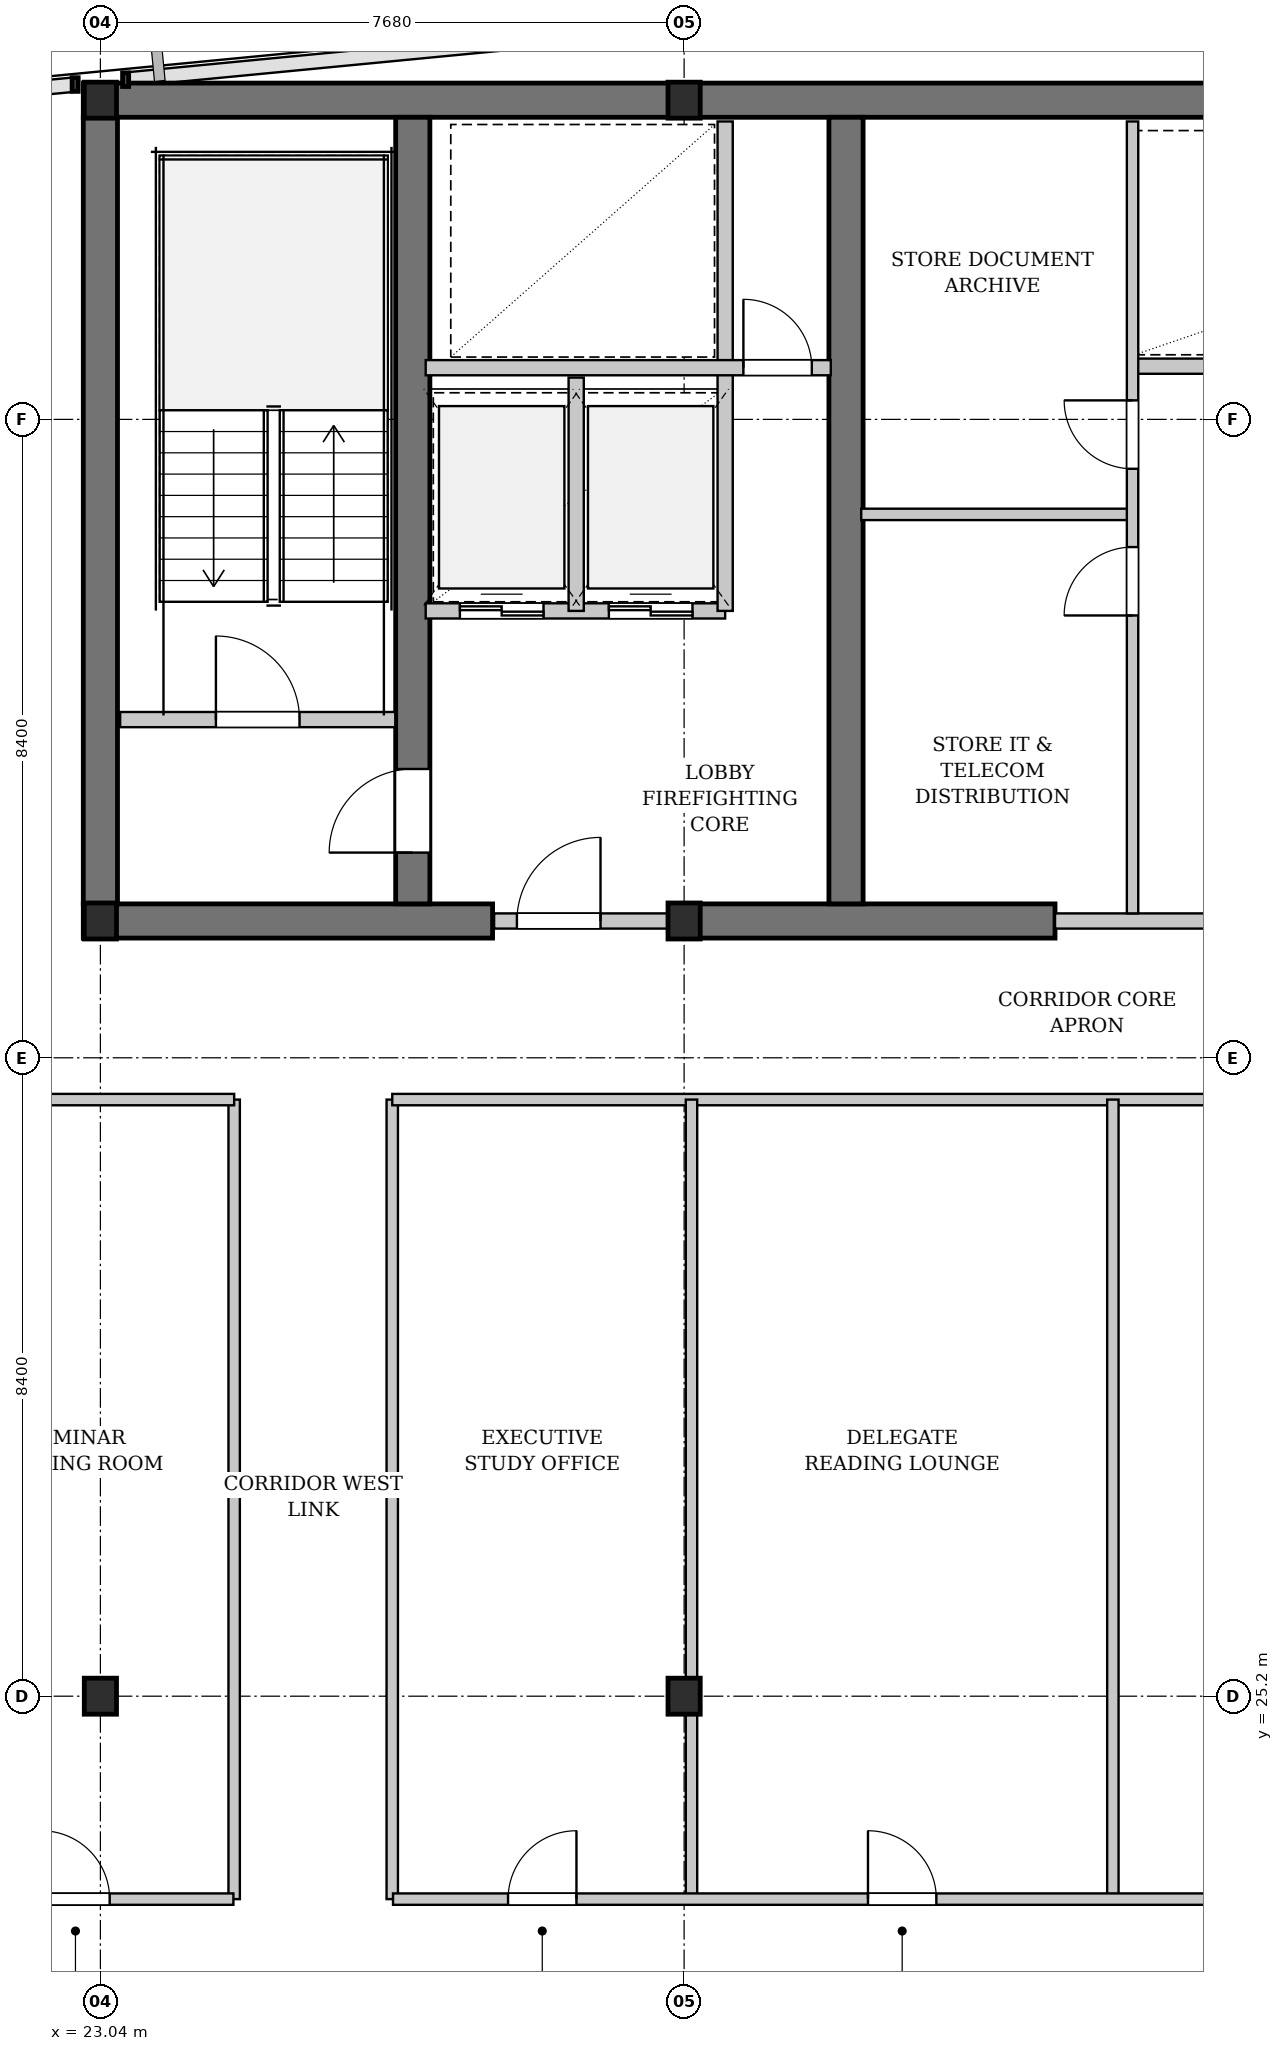
"""IFC4 building model, lengths in metres.
Left out: names, types, materials, properties, quantities, classifications, styles, units other than length and angle.
Written with IfcOpenShell. Run it as: python <this file> out.ifc"""

import sys

from ifc_helpers import new_model, si_unit, direction, frame, frame_2d, origin, origin_2d, place, context, subcontext, project, spatial, rectangle, i_section, extrude, element, fill, save


model = new_model("IFC4")
c1 = context("Model", 3, precision=1e-05, world=origin(), true_north=direction((0.0, 1.0)))
c2 = subcontext(c1, "Body", "Model", "MODEL_VIEW")
j1 = project(units=[si_unit("LENGTHUNIT", "METRE"), si_unit("PLANEANGLEUNIT", "RADIAN")], contexts=[c1])
p1 = place(None, origin())
s1 = spatial("IfcSite", under=j1, at=p1, CompositionType="ELEMENT")
p2 = place(p1, origin())
s2 = spatial("IfcBuilding", under=s1, at=p2, CompositionType="ELEMENT")
p3 = place(p2, frame((0.0, 0.0, 123.7)))
s3 = spatial("IfcBuildingStorey", under=s2, at=p3, CompositionType="ELEMENT", Elevation=123.7)
p4 = place(p3, frame((22.815, 46.2, 0.0), z_axis=(0.0, 0.0, 1.0), x_axis=(1.0, 0.0, 0.0)))
e1 = element("IfcWall", 1, at=p4, inside=s3, PredefinedType="SHEAR", context=c2, shape_type="SweptSolid", body=[
    extrude(rectangle(XDim=31.17, YDim=0.45, at=frame_2d((15.585, 0.0))), origin(), (0.0, 0.0, 1.0), 3.18),
])
p5 = place(p3, frame((22.815, 35.4, 0.0), z_axis=(0.0, 0.0, 1.0), x_axis=(1.0, 0.0, 0.0)))
e2 = element("IfcWall", 2, at=p5, inside=s3, PredefinedType="SHEAR", context=c2, shape_type="SweptSolid", body=[
    extrude(rectangle(XDim=5.385, YDim=0.45, at=frame_2d((2.692, 0.0))), origin(), (0.0, 0.0, 1.0), 3.18),
])
p6 = place(p3, frame((30.72, 35.4, 0.0), z_axis=(0.0, 0.0, 1.0), x_axis=(1.0, 0.0, 0.0)))
e3 = element("IfcWall", 3, at=p6, inside=s3, PredefinedType="SHEAR", context=c2, shape_type="SweptSolid", body=[
    extrude(rectangle(XDim=4.88, YDim=0.45, at=frame_2d((2.44, 0.0))), origin(), (0.0, 0.0, 1.0), 3.18),
])
p7 = place(p3, frame((23.04, 35.625, 0.0), z_axis=(0.0, 0.0, 1.0), x_axis=(0.0, 1.0, 0.0)))
e4 = element("IfcWall", 4, at=p7, inside=s3, PredefinedType="SHEAR", context=c2, shape_type="SweptSolid", body=[
    extrude(rectangle(XDim=10.35, YDim=0.45, at=frame_2d((5.175, 0.0))), origin(), (0.0, 0.0, 1.0), 3.18),
])
p8 = place(p3, frame((27.15, 35.625, 0.0), z_axis=(0.0, 0.0, 1.0), x_axis=(0.0, 1.0, 0.0)))
e5 = element("IfcWall", 5, at=p8, inside=s3, PredefinedType="SHEAR", context=c2, shape_type="SweptSolid", body=[
    extrude(rectangle(XDim=10.35, YDim=0.45, at=frame_2d((5.175, 0.0))), origin(), (0.0, 0.0, 1.0), 3.18),
])
p9 = place(p8, frame((0.675, 0.0, 0.0)))
e6 = element("IfcOpeningElement", 6, at=p9, cuts=e5, PredefinedType="OPENING", context=c2, shape_type="SweptSolid", body=[
    extrude(rectangle(XDim=1.1, YDim=2.15, at=frame_2d((0.55, 1.075))), frame((0.0, 0.235, 0.0), z_axis=(0.0, -1.0, 0.0), x_axis=(1.0, 0.0, 0.0)), (0.0, 0.0, 1.0), 0.47),
])
p10 = place(p3, frame((32.85, 35.625, 0.0), z_axis=(0.0, 0.0, 1.0), x_axis=(0.0, 1.0, 0.0)))
e7 = element("IfcWall", 7, at=p10, inside=s3, PredefinedType="SHEAR", context=c2, shape_type="SweptSolid", body=[
    extrude(rectangle(XDim=10.35, YDim=0.45, at=frame_2d((5.175, 0.0))), origin(), (0.0, 0.0, 1.0), 3.18),
])
for number, where, z_axis, x_axis in (
    (8, (23.04, 35.4, 0.0), (0.0, 0.0, 1.0), (1.0, 0.0, 0.0)),
    (9, (23.04, 46.2, 0.0), (0.0, 0.0, 1.0), (1.0, 0.0, 0.0)),
    (10, (23.04, 25.2, 0.0), (0.0, 0.0, 1.0), (1.0, 0.0, 0.0)),
    (11, (30.72, 35.4, 0.0), (0.0, 0.0, 1.0), (1.0, 0.0, 0.0)),
    (12, (30.72, 46.2, 0.0), (0.0, 0.0, 1.0), (1.0, 0.0, 0.0)),
    (13, (30.72, 25.2, 0.0), (0.0, 0.0, 1.0), (1.0, 0.0, 0.0)),
):
    element("IfcColumn", number, at=place(p3, frame(where, z_axis=z_axis, x_axis=x_axis)), inside=s3, PredefinedType="COLUMN", context=c2, shape_type="SweptSolid", body=[
        extrude(i_section(OverallWidth=0.424, OverallDepth=0.474, WebThickness=0.047, FlangeThickness=0.077, FilletRadius=0.015, at=origin_2d()), origin(), (0.0, 0.0, 1.0), 3.4),
    ])
p11 = place(p3, frame((23.3, 38.05, 0.0), z_axis=(0.0, 0.0, 1.0), x_axis=(1.0, 0.0, 0.0)))
e14 = element("IfcWall", 14, at=p11, inside=s3, PredefinedType="PARTITIONING", context=c2, shape_type="SweptSolid", body=[
    extrude(rectangle(XDim=3.62, YDim=0.2, at=frame_2d((1.81, 0.0))), origin(), (0.0, 0.0, 1.0), 3.18),
])
p12 = place(p11, frame((1.26, 0.0, 0.0)))
e15 = element("IfcOpeningElement", 15, at=p12, cuts=e14, PredefinedType="OPENING", context=c2, shape_type="SweptSolid", body=[
    extrude(rectangle(XDim=1.1, YDim=2.15, at=frame_2d((0.55, 1.075))), frame((0.0, 0.11, 0.0), z_axis=(0.0, -1.0, 0.0), x_axis=(1.0, 0.0, 0.0)), (0.0, 0.0, 1.0), 0.22),
])
p13 = place(p3, frame((28.22, 35.4, 0.0), z_axis=(0.0, 0.0, 1.0), x_axis=(1.0, 0.0, 0.0)))
e16 = element("IfcWall", 16, at=p13, inside=s3, PredefinedType="PARTITIONING", context=c2, shape_type="SweptSolid", body=[
    extrude(rectangle(XDim=2.5, YDim=0.2, at=frame_2d((1.25, 0.0))), origin(), (0.0, 0.0, 1.0), 2.525),
])
p14 = place(p13, frame((0.3, 0.0, 0.0)))
e17 = element("IfcOpeningElement", 17, at=p14, cuts=e16, PredefinedType="OPENING", context=c2, shape_type="SweptSolid", body=[
    extrude(rectangle(XDim=1.1, YDim=2.15, at=frame_2d((0.55, 1.075))), frame((0.0, 0.11, 0.0), z_axis=(0.0, -1.0, 0.0), x_axis=(1.0, 0.0, 0.0)), (0.0, 0.0, 1.0), 0.22),
])
p15 = place(p3, frame((27.32, 39.48, 0.0), z_axis=(0.0, 0.0, 1.0), x_axis=(1.0, 0.0, 0.0)))
e18 = element("IfcWall", 18, at=p15, inside=s3, PredefinedType="PARTITIONING", context=c2, shape_type="SweptSolid", body=[
    extrude(rectangle(XDim=3.94, YDim=0.2, at=frame_2d((1.97, 0.0))), origin(), (0.0, 0.0, 1.0), 3.18),
])
p16 = place(p15, frame((0.45, 0.0, 0.0)))
e19 = element("IfcOpeningElement", 19, at=p16, cuts=e18, PredefinedType="OPENING", context=c2, shape_type="SweptSolid", body=[
    extrude(rectangle(XDim=1.1, YDim=2.2, at=frame_2d((0.55, 1.1))), frame((0.0, 0.11, 0.0), z_axis=(0.0, -1.0, 0.0), x_axis=(1.0, 0.0, 0.0)), (0.0, 0.0, 1.0), 0.22),
])
p17 = place(p15, frame((2.41, 0.0, 0.0)))
e20 = element("IfcOpeningElement", 20, at=p17, cuts=e18, PredefinedType="OPENING", context=c2, shape_type="SweptSolid", body=[
    extrude(rectangle(XDim=1.1, YDim=2.2, at=frame_2d((0.55, 1.1))), frame((0.0, 0.11, 0.0), z_axis=(0.0, -1.0, 0.0), x_axis=(1.0, 0.0, 0.0)), (0.0, 0.0, 1.0), 0.22),
])
p18 = place(p3, frame((29.3, 39.48, 0.0), z_axis=(0.0, 0.0, 1.0), x_axis=(0.0, 1.0, 0.0)))
e21 = element("IfcWall", 21, at=p18, inside=s3, PredefinedType="PARTITIONING", context=c2, shape_type="SweptSolid", body=[
    extrude(rectangle(XDim=3.07, YDim=0.2, at=frame_2d((1.535, 0.0))), origin(), (0.0, 0.0, 1.0), 3.18),
])
p19 = place(p3, frame((31.26, 39.48, 0.0), z_axis=(0.0, 0.0, 1.0), x_axis=(0.0, 1.0, 0.0)))
e22 = element("IfcWall", 22, at=p19, inside=s3, PredefinedType="PARTITIONING", context=c2, shape_type="SweptSolid", body=[
    extrude(rectangle(XDim=6.44, YDim=0.2, at=frame_2d((3.22, 0.0))), origin(), (0.0, 0.0, 1.0), 3.18),
])
p20 = place(p3, frame((27.32, 42.68, 0.0), z_axis=(0.0, 0.0, 1.0), x_axis=(1.0, 0.0, 0.0)))
e23 = element("IfcWall", 23, at=p20, inside=s3, PredefinedType="PARTITIONING", context=c2, shape_type="SweptSolid", body=[
    extrude(rectangle(XDim=5.33, YDim=0.2, at=frame_2d((2.665, 0.0))), origin(), (0.0, 0.0, 1.0), 3.18),
])
p21 = place(p20, frame((4.18, 0.0, 0.0)))
e24 = element("IfcOpeningElement", 24, at=p21, cuts=e23, PredefinedType="OPENING", context=c2, shape_type="SweptSolid", body=[
    extrude(rectangle(XDim=0.9, YDim=2.15, at=frame_2d((0.45, 1.075))), frame((0.0, 0.11, 0.0), z_axis=(0.0, -1.0, 0.0), x_axis=(1.0, 0.0, 0.0)), (0.0, 0.0, 1.0), 0.22),
])
p22 = place(p3, frame((35.6, 35.4, 0.0), z_axis=(0.0, 0.0, 1.0), x_axis=(1.0, 0.0, 0.0)))
e25 = element("IfcWall", 25, at=p22, inside=s3, PredefinedType="PARTITIONING", context=c2, shape_type="SweptSolid", body=[
    extrude(rectangle(XDim=6.5, YDim=0.2, at=frame_2d((3.25, 0.0))), origin(), (0.0, 0.0, 1.0), 2.525),
])
p23 = place(p22, frame((3.8, 0.0, 0.0)))
e26 = element("IfcOpeningElement", 26, at=p23, cuts=e25, PredefinedType="OPENING", context=c2, shape_type="SweptSolid", body=[
    extrude(rectangle(XDim=1.8, YDim=2.3, at=frame_2d((0.9, 1.15))), frame((0.0, 0.11, 0.0), z_axis=(0.0, -1.0, 0.0), x_axis=(1.0, 0.0, 0.0)), (0.0, 0.0, 1.0), 0.22),
])
p24 = place(p3, frame((36.6, 42.7, 0.0), z_axis=(0.0, 0.0, 1.0), x_axis=(1.0, 0.0, 0.0)))
e27 = element("IfcWall", 27, at=p24, inside=s3, PredefinedType="PARTITIONING", context=c2, shape_type="SweptSolid", body=[
    extrude(rectangle(XDim=5.25, YDim=0.2, at=frame_2d((2.625, 0.0))), origin(), (0.0, 0.0, 1.0), 3.18),
])
p25 = place(p3, frame((33.05, 40.75, 0.0), z_axis=(0.0, 0.0, 1.0), x_axis=(1.0, 0.0, 0.0)))
e28 = element("IfcWall", 28, at=p25, inside=s3, PredefinedType="PARTITIONING", context=c2, shape_type="SweptSolid", body=[
    extrude(rectangle(XDim=3.57, YDim=0.15, at=frame_2d((1.785, 0.0))), origin(), (0.0, 0.0, 1.0), 3.18),
])
p26 = place(p3, frame((36.62, 35.5, 0.0), z_axis=(0.0, 0.0, 1.0), x_axis=(0.0, 1.0, 0.0)))
e29 = element("IfcWall", 29, at=p26, inside=s3, PredefinedType="PARTITIONING", context=c2, shape_type="SweptSolid", body=[
    extrude(rectangle(XDim=10.42, YDim=0.15, at=frame_2d((5.21, 0.0))), origin(), (0.0, 0.0, 1.0), 3.18),
])
p27 = place(p26, frame((3.92, 0.0, 0.0)))
e30 = element("IfcOpeningElement", 30, at=p27, cuts=e29, PredefinedType="OPENING", context=c2, shape_type="SweptSolid", body=[
    extrude(rectangle(XDim=0.9, YDim=2.15, at=frame_2d((0.45, 1.075))), frame((0.0, 0.085, 0.0), z_axis=(0.0, -1.0, 0.0), x_axis=(1.0, 0.0, 0.0)), (0.0, 0.0, 1.0), 0.17),
])
p28 = place(p26, frame((5.85, 0.0, 0.0)))
e31 = element("IfcOpeningElement", 31, at=p28, cuts=e29, PredefinedType="OPENING", context=c2, shape_type="SweptSolid", body=[
    extrude(rectangle(XDim=0.9, YDim=2.15, at=frame_2d((0.45, 1.075))), frame((0.0, 0.085, 0.0), z_axis=(0.0, -1.0, 0.0), x_axis=(1.0, 0.0, 0.0)), (0.0, 0.0, 1.0), 0.17),
])
for number, where, z_axis, x_axis in (
    (32, (24.8, 22.53, 0.0), (0.0, 0.0, 1.0), (0.0, 1.0, 0.0)),
    (33, (26.88, 22.53, 0.0), (0.0, 0.0, 1.0), (0.0, 1.0, 0.0)),
):
    element("IfcWall", number, at=place(p3, frame(where, z_axis=z_axis, x_axis=x_axis)), inside=s3, PredefinedType="PARTITIONING", context=c2, shape_type="SweptSolid", body=[
        extrude(rectangle(XDim=10.52, YDim=0.15, at=frame_2d((5.26, 0.0))), origin(), (0.0, 0.0, 1.0), 3.18),
    ])
p29 = place(p3, frame((20.614, 33.05, 0.0), z_axis=(0.0, 0.0, 1.0), x_axis=(1.0, 0.0, 0.0)))
e34 = element("IfcWall", 34, at=p29, inside=s3, PredefinedType="PARTITIONING", context=c2, shape_type="SweptSolid", body=[
    extrude(rectangle(XDim=4.186, YDim=0.15, at=frame_2d((2.093, 0.0))), origin(), (0.0, 0.0, 1.0), 3.18),
])
p30 = place(p3, frame((26.88, 33.05, 0.0), z_axis=(0.0, 0.0, 1.0), x_axis=(1.0, 0.0, 0.0)))
e35 = element("IfcWall", 35, at=p30, inside=s3, PredefinedType="PARTITIONING", context=c2, shape_type="SweptSolid", body=[
    extrude(rectangle(XDim=23.12, YDim=0.15, at=frame_2d((11.56, 0.0))), origin(), (0.0, 0.0, 1.0), 3.18),
])
p31 = place(p3, frame((20.634, 22.53, 0.0), z_axis=(0.0, 0.0, 1.0), x_axis=(1.0, 0.0, 0.0)))
e36 = element("IfcWall", 36, at=p31, inside=s3, PredefinedType="PARTITIONING", context=c2, shape_type="SweptSolid", body=[
    extrude(rectangle(XDim=4.156, YDim=0.15, at=frame_2d((2.078, 0.0))), origin(), (0.0, 0.0, 1.0), 3.18),
])
p32 = place(p31, frame((1.628, 0.0, 0.0)))
e37 = element("IfcOpeningElement", 37, at=p32, cuts=e36, PredefinedType="OPENING", context=c2, shape_type="SweptSolid", body=[
    extrude(rectangle(XDim=0.9, YDim=2.15, at=frame_2d((0.45, 1.075))), frame((0.0, 0.085, 0.0), z_axis=(0.0, -1.0, 0.0), x_axis=(1.0, 0.0, 0.0)), (0.0, 0.0, 1.0), 0.17),
])
p33 = place(p3, frame((30.817, 22.53, 0.0), z_axis=(0.0, 0.0, 1.0), x_axis=(0.0, 1.0, 0.0)))
e38 = element("IfcWall", 38, at=p33, inside=s3, PredefinedType="PARTITIONING", context=c2, shape_type="SweptSolid", body=[
    extrude(rectangle(XDim=10.52, YDim=0.15, at=frame_2d((5.26, 0.0))), origin(), (0.0, 0.0, 1.0), 2.525),
])
p34 = place(p3, frame((36.361, 22.53, 0.0), z_axis=(0.0, 0.0, 1.0), x_axis=(0.0, 1.0, 0.0)))
e39 = element("IfcWall", 39, at=p34, inside=s3, PredefinedType="PARTITIONING", context=c2, shape_type="SweptSolid", body=[
    extrude(rectangle(XDim=10.52, YDim=0.15, at=frame_2d((5.26, 0.0))), origin(), (0.0, 0.0, 1.0), 3.18),
])
p35 = place(p3, frame((26.89, 22.53, 0.0), z_axis=(0.0, 0.0, 1.0), x_axis=(1.0, 0.0, 0.0)))
e40 = element("IfcWall", 40, at=p35, inside=s3, PredefinedType="PARTITIONING", context=c2, shape_type="SweptSolid", body=[
    extrude(rectangle(XDim=23.1, YDim=0.15, at=frame_2d((11.55, 0.0))), origin(), (0.0, 0.0, 1.0), 3.18),
])
p36 = place(p35, frame((1.513, 0.0, 0.0)))
e41 = element("IfcOpeningElement", 41, at=p36, cuts=e40, PredefinedType="OPENING", context=c2, shape_type="SweptSolid", body=[
    extrude(rectangle(XDim=0.9, YDim=2.15, at=frame_2d((0.45, 1.075))), frame((0.0, 0.085, 0.0), z_axis=(0.0, -1.0, 0.0), x_axis=(1.0, 0.0, 0.0)), (0.0, 0.0, 1.0), 0.17),
])
p37 = place(p35, frame((6.249, 0.0, 0.0)))
e42 = element("IfcOpeningElement", 42, at=p37, cuts=e40, PredefinedType="OPENING", context=c2, shape_type="SweptSolid", body=[
    extrude(rectangle(XDim=0.9, YDim=2.15, at=frame_2d((0.45, 1.075))), frame((0.0, 0.085, 0.0), z_axis=(0.0, -1.0, 0.0), x_axis=(1.0, 0.0, 0.0)), (0.0, 0.0, 1.0), 0.17),
])
p38 = place(p35, frame((12.602, 0.0, 0.0)))
e43 = element("IfcOpeningElement", 43, at=p38, cuts=e40, PredefinedType="OPENING", context=c2, shape_type="SweptSolid", body=[
    extrude(rectangle(XDim=0.9, YDim=2.15, at=frame_2d((0.45, 1.075))), frame((0.0, 0.085, 0.0), z_axis=(0.0, -1.0, 0.0), x_axis=(1.0, 0.0, 0.0)), (0.0, 0.0, 1.0), 0.17),
])
p39 = place(p35, frame((19.416, 0.0, 0.0)))
e44 = element("IfcOpeningElement", 44, at=p39, cuts=e40, PredefinedType="OPENING", context=c2, shape_type="SweptSolid", body=[
    extrude(rectangle(XDim=0.9, YDim=2.15, at=frame_2d((0.45, 1.075))), frame((0.0, 0.085, 0.0), z_axis=(0.0, -1.0, 0.0), x_axis=(1.0, 0.0, 0.0)), (0.0, 0.0, 1.0), 0.17),
])
p40 = place(p12, origin())
e45 = element("IfcDoor", 45, at=p40, inside=s3, OperationType="SINGLE_SWING_LEFT", PredefinedType="DOOR", context=c2, shape_type="SweptSolid", body=[
    extrude(rectangle(XDim=1.1, YDim=2.15, at=frame_2d((0.55, 1.075))), frame((0.0, 0.025, 0.0), z_axis=(0.0, -1.0, 0.0), x_axis=(1.0, 0.0, 0.0)), (0.0, 0.0, 1.0), 0.05),
])
fill(e15, e45)
p41 = place(p14, origin())
e46 = element("IfcDoor", 46, at=p41, inside=s3, OperationType="SINGLE_SWING_RIGHT", PredefinedType="DOOR", context=c2, shape_type="SweptSolid", body=[
    extrude(rectangle(XDim=1.1, YDim=2.15, at=frame_2d((0.55, 1.075))), frame((0.0, 0.025, 0.0), z_axis=(0.0, -1.0, 0.0), x_axis=(1.0, 0.0, 0.0)), (0.0, 0.0, 1.0), 0.05),
])
fill(e17, e46)
p42 = place(p16, origin())
e47 = element("IfcDoor", 47, at=p42, inside=s3, OperationType="DOUBLE_DOOR_SLIDING", PredefinedType="DOOR", context=c2, shape_type="SweptSolid", body=[
    extrude(rectangle(XDim=1.1, YDim=2.2, at=frame_2d((0.55, 1.1))), frame((0.0, 0.025, 0.0), z_axis=(0.0, -1.0, 0.0), x_axis=(1.0, 0.0, 0.0)), (0.0, 0.0, 1.0), 0.05),
])
fill(e19, e47)
p43 = place(p17, origin())
e48 = element("IfcDoor", 48, at=p43, inside=s3, OperationType="DOUBLE_DOOR_SLIDING", PredefinedType="DOOR", context=c2, shape_type="SweptSolid", body=[
    extrude(rectangle(XDim=1.1, YDim=2.2, at=frame_2d((0.55, 1.1))), frame((0.0, 0.025, 0.0), z_axis=(0.0, -1.0, 0.0), x_axis=(1.0, 0.0, 0.0)), (0.0, 0.0, 1.0), 0.05),
])
fill(e20, e48)
p44 = place(p21, origin())
e49 = element("IfcDoor", 49, at=p44, inside=s3, OperationType="SINGLE_SWING_LEFT", PredefinedType="DOOR", context=c2, shape_type="SweptSolid", body=[
    extrude(rectangle(XDim=0.9, YDim=2.15, at=frame_2d((0.45, 1.075))), frame((0.0, 0.025, 0.0), z_axis=(0.0, -1.0, 0.0), x_axis=(1.0, 0.0, 0.0)), (0.0, 0.0, 1.0), 0.05),
])
fill(e24, e49)
p45 = place(p27, origin())
e50 = element("IfcDoor", 50, at=p45, inside=s3, OperationType="SINGLE_SWING_LEFT", PredefinedType="DOOR", context=c2, shape_type="SweptSolid", body=[
    extrude(rectangle(XDim=0.9, YDim=2.15, at=frame_2d((0.45, 1.075))), frame((0.0, 0.025, 0.0), z_axis=(0.0, -1.0, 0.0), x_axis=(1.0, 0.0, 0.0)), (0.0, 0.0, 1.0), 0.05),
])
fill(e30, e50)
p46 = place(p28, origin())
e51 = element("IfcDoor", 51, at=p46, inside=s3, OperationType="SINGLE_SWING_RIGHT", PredefinedType="DOOR", context=c2, shape_type="SweptSolid", body=[
    extrude(rectangle(XDim=0.9, YDim=2.15, at=frame_2d((0.45, 1.075))), frame((0.0, 0.025, 0.0), z_axis=(0.0, -1.0, 0.0), x_axis=(1.0, 0.0, 0.0)), (0.0, 0.0, 1.0), 0.05),
])
fill(e31, e51)
p47 = place(p32, origin())
e52 = element("IfcDoor", 52, at=p47, inside=s3, OperationType="SINGLE_SWING_LEFT", PredefinedType="DOOR", context=c2, shape_type="SweptSolid", body=[
    extrude(rectangle(XDim=0.9, YDim=2.15, at=frame_2d((0.45, 1.075))), frame((0.0, 0.025, 0.0), z_axis=(0.0, -1.0, 0.0), x_axis=(1.0, 0.0, 0.0)), (0.0, 0.0, 1.0), 0.05),
])
fill(e37, e52)
p48 = place(p36, origin())
e53 = element("IfcDoor", 53, at=p48, inside=s3, OperationType="SINGLE_SWING_RIGHT", PredefinedType="DOOR", context=c2, shape_type="SweptSolid", body=[
    extrude(rectangle(XDim=0.9, YDim=2.15, at=frame_2d((0.45, 1.075))), frame((0.0, 0.025, 0.0), z_axis=(0.0, -1.0, 0.0), x_axis=(1.0, 0.0, 0.0)), (0.0, 0.0, 1.0), 0.05),
])
fill(e41, e53)
p49 = place(p37, origin())
e54 = element("IfcDoor", 54, at=p49, inside=s3, OperationType="SINGLE_SWING_LEFT", PredefinedType="DOOR", context=c2, shape_type="SweptSolid", body=[
    extrude(rectangle(XDim=0.9, YDim=2.15, at=frame_2d((0.45, 1.075))), frame((0.0, 0.025, 0.0), z_axis=(0.0, -1.0, 0.0), x_axis=(1.0, 0.0, 0.0)), (0.0, 0.0, 1.0), 0.05),
])
fill(e42, e54)
p50 = place(p9, origin())
e55 = element("IfcDoor", 55, at=p50, inside=s3, OperationType="SINGLE_SWING_LEFT", PredefinedType="DOOR", context=c2, shape_type="SweptSolid", body=[
    extrude(rectangle(XDim=1.1, YDim=2.15, at=frame_2d((0.55, 1.075))), frame((0.0, 0.025, 0.0), z_axis=(0.0, -1.0, 0.0), x_axis=(1.0, 0.0, 0.0)), (0.0, 0.0, 1.0), 0.05),
])
fill(e6, e55)
save(model, sys.argv[1])
